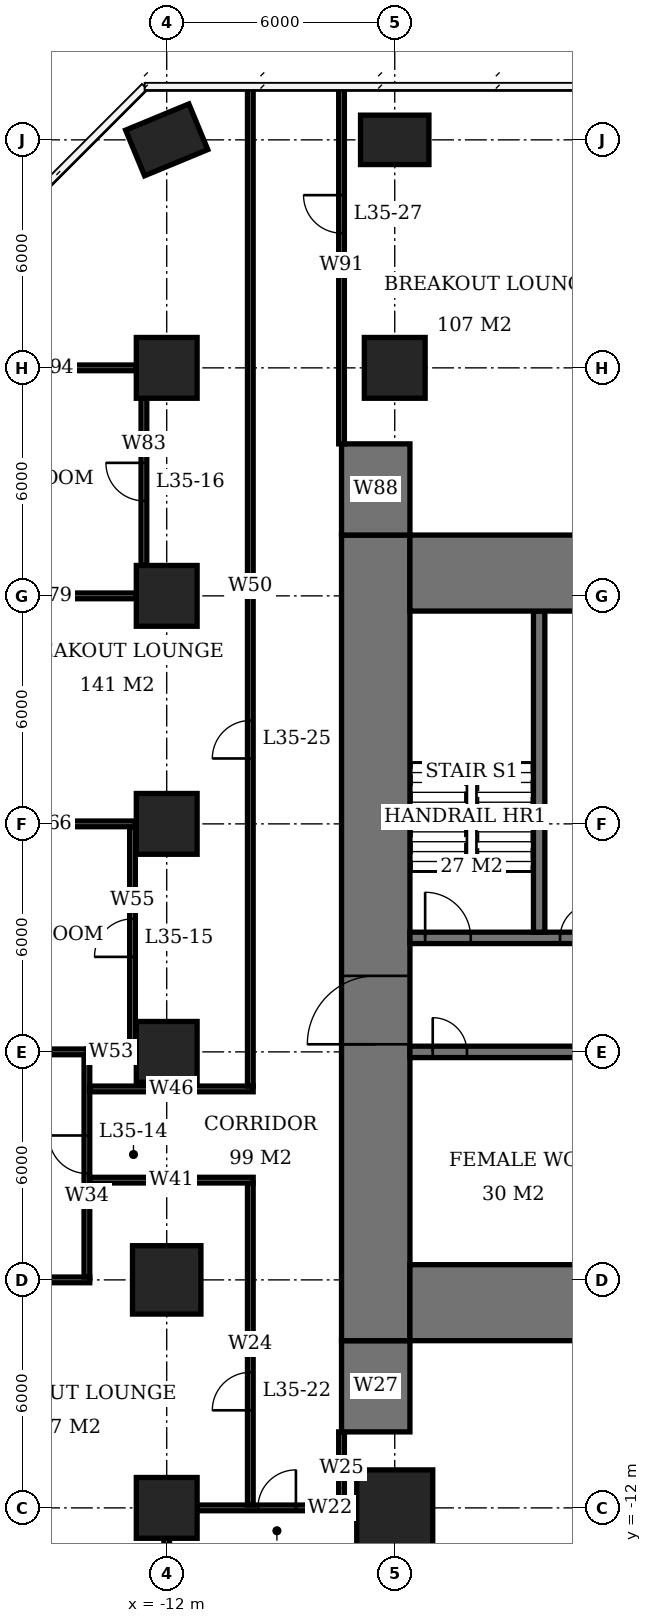
"""IFC4 building model, lengths in metres.
Left out: names, types, materials, properties, quantities, classifications, styles, units other than length and angle.
Written with IfcOpenShell. Run it as: python <this file> out.ifc"""

import sys

from ifc_helpers import new_model, si_unit, direction, frame, frame_2d, origin, origin_2d, place, context, subcontext, project, spatial, rectangle, extrude, element, fill, save


model = new_model("IFC4")
c1 = context("Model", 3, precision=1e-05, world=origin(), true_north=direction((0.0, 1.0)))
c2 = subcontext(c1, "Body", "Model", "MODEL_VIEW")
j1 = project(units=[si_unit("LENGTHUNIT", "METRE"), si_unit("PLANEANGLEUNIT", "RADIAN")], contexts=[c1])
p1 = place(None, origin())
s1 = spatial("IfcSite", under=j1, at=p1, CompositionType="ELEMENT")
p2 = place(p1, origin())
s2 = spatial("IfcBuilding", under=s1, at=p2, CompositionType="ELEMENT")
p3 = place(p2, frame((0.0, 0.0, 144.5)))
s3 = spatial("IfcBuildingStorey", under=s2, at=p3, CompositionType="ELEMENT", Elevation=144.5)
p4 = place(p3, frame((-12.0, -12.0, 0.0), z_axis=(0.0, 0.0, 1.0), x_axis=(1.0, 0.0, 0.0)))
e1 = element("IfcColumn", 1, at=p4, inside=s3, PredefinedType="COLUMN", context=c2, shape_type="SweptSolid", body=[
    extrude(rectangle(XDim=1.6, YDim=1.6, at=origin_2d()), origin(), (0.0, 0.0, 1.0), 3.9),
])
p5 = place(p3, frame((-12.0, -6.0, 0.0), z_axis=(0.0, 0.0, 1.0), x_axis=(1.0, 0.0, 0.0)))
e2 = element("IfcColumn", 2, at=p5, inside=s3, PredefinedType="COLUMN", context=c2, shape_type="SweptSolid", body=[
    extrude(rectangle(XDim=1.8, YDim=1.8, at=origin_2d()), origin(), (0.0, 0.0, 1.0), 3.9),
])
for number, where, z_axis, x_axis in (
    (3, (-12.0, 0.0, 0.0), (0.0, 0.0, 1.0), (1.0, 0.0, 0.0)),
    (4, (-12.0, 6.0, 0.0), (0.0, 0.0, 1.0), (1.0, 0.0, 0.0)),
    (5, (-12.0, 12.0, 0.0), (0.0, 0.0, 1.0), (1.0, 0.0, 0.0)),
    (6, (-12.0, 18.0, 0.0), (0.0, 0.0, 1.0), (1.0, 0.0, 0.0)),
):
    element("IfcColumn", number, at=place(p3, frame(where, z_axis=z_axis, x_axis=x_axis)), inside=s3, PredefinedType="COLUMN", context=c2, shape_type="SweptSolid", body=[
        extrude(rectangle(XDim=1.6, YDim=1.6, at=origin_2d()), origin(), (0.0, 0.0, 1.0), 3.9),
    ])
p6 = place(p3, frame((-12.0, 24.0, 0.0), z_axis=(0.0, 0.0, 1.0), x_axis=(0.923879532511, 0.382683432365, 0.0)))
e7 = element("IfcColumn", 7, at=p6, inside=s3, PredefinedType="COLUMN", context=c2, shape_type="SweptSolid", body=[
    extrude(rectangle(XDim=1.8, YDim=1.3, at=origin_2d()), origin(), (0.0, 0.0, 1.0), 3.9),
])
p7 = place(p3, frame((-6.0, -12.0, 0.0), z_axis=(0.0, 0.0, 1.0), x_axis=(1.0, 0.0, 0.0)))
e8 = element("IfcColumn", 8, at=p7, inside=s3, PredefinedType="COLUMN", context=c2, shape_type="SweptSolid", body=[
    extrude(rectangle(XDim=2.0, YDim=2.0, at=origin_2d()), origin(), (0.0, 0.0, 1.0), 3.9),
])
p8 = place(p3, frame((-6.0, 18.0, 0.0), z_axis=(0.0, 0.0, 1.0), x_axis=(1.0, 0.0, 0.0)))
e9 = element("IfcColumn", 9, at=p8, inside=s3, PredefinedType="COLUMN", context=c2, shape_type="SweptSolid", body=[
    extrude(rectangle(XDim=1.6, YDim=1.6, at=origin_2d()), origin(), (0.0, 0.0, 1.0), 3.9),
])
p9 = place(p3, frame((-6.0, 24.0, 0.0), z_axis=(0.0, 0.0, 1.0), x_axis=(1.0, 0.0, 0.0)))
e10 = element("IfcColumn", 10, at=p9, inside=s3, PredefinedType="COLUMN", context=c2, shape_type="SweptSolid", body=[
    extrude(rectangle(XDim=1.8, YDim=1.3, at=origin_2d()), origin(), (0.0, 0.0, 1.0), 3.9),
])
for number, where, z_axis, x_axis in (
    (11, (-5.6, -6.6, 0.0), (0.0, 0.0, 1.0), (1.0, 0.0, 0.0)),
    (12, (-5.6, 12.6, 0.0), (0.0, 0.0, 1.0), (1.0, 0.0, 0.0)),
):
    element("IfcWall", number, at=place(p3, frame(where, z_axis=z_axis, x_axis=x_axis)), inside=s3, PredefinedType="SHEAR", context=c2, shape_type="SweptSolid", body=[
        extrude(rectangle(XDim=23.2, YDim=2.0, at=frame_2d((11.6, 0.0))), origin(), (0.0, 0.0, 1.0), 3.9),
    ])
p10 = place(p3, frame((-6.5, -7.6, 0.0), z_axis=(0.0, 0.0, 1.0), x_axis=(0.0, 1.0, 0.0)))
e13 = element("IfcWall", 13, at=p10, inside=s3, PredefinedType="SHEAR", context=c2, shape_type="SweptSolid", body=[
    extrude(rectangle(XDim=21.2, YDim=1.8, at=frame_2d((10.6, 0.0))), origin(), (0.0, 0.0, 1.0), 3.9),
])
p11 = place(p10, frame((7.8, 0.0, 0.0)))
e14 = element("IfcOpeningElement", 14, at=p11, cuts=e13, PredefinedType="OPENING", context=c2, shape_type="SweptSolid", body=[
    extrude(rectangle(XDim=1.8, YDim=2.4, at=frame_2d((0.9, 1.2))), frame((0.0, 0.91, 0.0), z_axis=(0.0, -1.0, 0.0), x_axis=(1.0, 0.0, 0.0)), (0.0, 0.0, 1.0), 1.82),
])
for number, where, z_axis, x_axis in (
    (15, (-6.5, -10.0, 0.0), (0.0, 0.0, 1.0), (0.0, 1.0, 0.0)),
    (16, (-6.5, 13.6, 0.0), (0.0, 0.0, 1.0), (0.0, 1.0, 0.0)),
):
    element("IfcWall", number, at=place(p3, frame(where, z_axis=z_axis, x_axis=x_axis)), inside=s3, PredefinedType="SHEAR", context=c2, shape_type="SweptSolid", body=[
        extrude(rectangle(XDim=2.4, YDim=1.8, at=frame_2d((1.2, 0.0))), origin(), (0.0, 0.0, 1.0), 3.9),
    ])
p12 = place(p3, frame((-5.6, 0.0, 0.0), z_axis=(0.0, 0.0, 1.0), x_axis=(1.0, 0.0, 0.0)))
e17 = element("IfcWall", 17, at=p12, inside=s3, PredefinedType="SHEAR", context=c2, shape_type="SweptSolid", body=[
    extrude(rectangle(XDim=17.75, YDim=0.3, at=frame_2d((8.875, 0.0))), origin(), (0.0, 0.0, 1.0), 3.9),
])
p13 = place(p12, frame((0.6, 0.0, 0.0)))
e18 = element("IfcOpeningElement", 18, at=p13, cuts=e17, PredefinedType="OPENING", context=c2, shape_type="SweptSolid", body=[
    extrude(rectangle(XDim=0.9, YDim=2.1, at=frame_2d((0.45, 1.05))), frame((0.0, 0.16, 0.0), z_axis=(0.0, -1.0, 0.0), x_axis=(1.0, 0.0, 0.0)), (0.0, 0.0, 1.0), 0.32),
])
p14 = place(p12, frame((6.55, 0.0, 0.0)))
e19 = element("IfcOpeningElement", 19, at=p14, cuts=e17, PredefinedType="OPENING", context=c2, shape_type="SweptSolid", body=[
    extrude(rectangle(XDim=1.1, YDim=2.1, at=frame_2d((0.55, 1.05))), frame((0.0, 0.16, 0.0), z_axis=(0.0, -1.0, 0.0), x_axis=(1.0, 0.0, 0.0)), (0.0, 0.0, 1.0), 0.32),
])
p15 = place(p12, frame((9.55, 0.0, 0.0)))
e20 = element("IfcOpeningElement", 20, at=p15, cuts=e17, PredefinedType="OPENING", context=c2, shape_type="SweptSolid", body=[
    extrude(rectangle(XDim=1.1, YDim=2.1, at=frame_2d((0.55, 1.05))), frame((0.0, 0.16, 0.0), z_axis=(0.0, -1.0, 0.0), x_axis=(1.0, 0.0, 0.0)), (0.0, 0.0, 1.0), 0.32),
])
p16 = place(p3, frame((-5.6, 3.0, 0.0), z_axis=(0.0, 0.0, 1.0), x_axis=(1.0, 0.0, 0.0)))
e21 = element("IfcWall", 21, at=p16, inside=s3, PredefinedType="SHEAR", context=c2, shape_type="SweptSolid", body=[
    extrude(rectangle(XDim=5.45, YDim=0.3, at=frame_2d((2.725, 0.0))), origin(), (0.0, 0.0, 1.0), 3.9),
])
p17 = place(p16, frame((0.4, 0.0, 0.0)))
e22 = element("IfcOpeningElement", 22, at=p17, cuts=e21, PredefinedType="OPENING", context=c2, shape_type="SweptSolid", body=[
    extrude(rectangle(XDim=1.2, YDim=2.1, at=frame_2d((0.6, 1.05))), frame((0.0, 0.16, 0.0), z_axis=(0.0, -1.0, 0.0), x_axis=(1.0, 0.0, 0.0)), (0.0, 0.0, 1.0), 0.32),
])
p18 = place(p16, frame((3.95, 0.0, 0.0)))
e23 = element("IfcOpeningElement", 23, at=p18, cuts=e21, PredefinedType="OPENING", context=c2, shape_type="SweptSolid", body=[
    extrude(rectangle(XDim=0.9, YDim=2.1, at=frame_2d((0.45, 1.05))), frame((0.0, 0.16, 0.0), z_axis=(0.0, -1.0, 0.0), x_axis=(1.0, 0.0, 0.0)), (0.0, 0.0, 1.0), 0.32),
])
p19 = place(p3, frame((-2.2, 3.15, 0.0), z_axis=(0.0, 0.0, 1.0), x_axis=(0.0, 1.0, 0.0)))
e24 = element("IfcWall", 24, at=p19, inside=s3, PredefinedType="SHEAR", context=c2, shape_type="SweptSolid", body=[
    extrude(rectangle(XDim=8.45, YDim=0.3, at=frame_2d((4.225, 0.0))), origin(), (0.0, 0.0, 1.0), 3.9),
])
p20 = place(p3, frame((-11.2, -12.0, 0.0), z_axis=(0.0, 0.0, 1.0), x_axis=(1.0, 0.0, 0.0)))
e25 = element("IfcWall", 25, at=p20, inside=s3, PredefinedType="PARTITIONING", context=c2, shape_type="SweptSolid", body=[
    extrude(rectangle(XDim=4.2, YDim=0.15, at=frame_2d((2.1, 0.0))), origin(), (0.0, 0.0, 1.0), 3.65),
])
p21 = place(p20, frame((1.6, 0.0, 0.0)))
e26 = element("IfcOpeningElement", 26, at=p21, cuts=e25, PredefinedType="OPENING", context=c2, shape_type="SweptSolid", body=[
    extrude(rectangle(XDim=1.0, YDim=2.1, at=frame_2d((0.5, 1.05))), frame((0.0, 0.085, 0.0), z_axis=(0.0, -1.0, 0.0), x_axis=(1.0, 0.0, 0.0)), (0.0, 0.0, 1.0), 0.17),
])
for number, where, z_axis, x_axis in (
    (27, (-17.35, -6.0, 0.0), (0.0, 0.0, 1.0), (1.0, 0.0, 0.0)),
    (28, (-17.35, 0.0, 0.0), (0.0, 0.0, 1.0), (1.0, 0.0, 0.0)),
):
    element("IfcWall", number, at=place(p3, frame(where, z_axis=z_axis, x_axis=x_axis)), inside=s3, PredefinedType="PARTITIONING", context=c2, shape_type="SweptSolid", body=[
        extrude(rectangle(XDim=3.325, YDim=0.15, at=frame_2d((1.663, 0.0))), origin(), (0.0, 0.0, 1.0), 3.65),
    ])
p22 = place(p3, frame((-14.1, 0.0, 0.0), z_axis=(0.0, 0.0, 1.0), x_axis=(1.0, 0.0, 0.0)))
e29 = element("IfcWall", 29, at=p22, inside=s3, PredefinedType="PARTITIONING", context=c2, shape_type="SweptSolid", body=[
    extrude(rectangle(XDim=1.275, YDim=0.15, at=frame_2d((0.638, 0.0))), origin(), (0.0, 0.0, 1.0), 3.65),
])
p23 = place(p3, frame((-17.35, 6.0, 0.0), z_axis=(0.0, 0.0, 1.0), x_axis=(1.0, 0.0, 0.0)))
e30 = element("IfcWall", 30, at=p23, inside=s3, PredefinedType="PARTITIONING", context=c2, shape_type="SweptSolid", body=[
    extrude(rectangle(XDim=4.525, YDim=0.15, at=frame_2d((2.263, 0.0))), origin(), (0.0, 0.0, 1.0), 3.65),
])
p24 = place(p3, frame((-17.35, 12.0, 0.0), z_axis=(0.0, 0.0, 1.0), x_axis=(1.0, 0.0, 0.0)))
e31 = element("IfcWall", 31, at=p24, inside=s3, PredefinedType="PARTITIONING", context=c2, shape_type="SweptSolid", body=[
    extrude(rectangle(XDim=4.55, YDim=0.15, at=frame_2d((2.275, 0.0))), origin(), (0.0, 0.0, 1.0), 3.65),
])
p25 = place(p3, frame((-17.265, 18.0, 0.0), z_axis=(0.0, 0.0, 1.0), x_axis=(1.0, 0.0, 0.0)))
e32 = element("IfcWall", 32, at=p25, inside=s3, PredefinedType="PARTITIONING", context=c2, shape_type="SweptSolid", body=[
    extrude(rectangle(XDim=4.465, YDim=0.15, at=frame_2d((2.233, 0.0))), origin(), (0.0, 0.0, 1.0), 3.65),
])
p26 = place(p3, frame((-14.1, -5.925, 0.0), z_axis=(0.0, 0.0, 1.0), x_axis=(0.0, 1.0, 0.0)))
e33 = element("IfcWall", 33, at=p26, inside=s3, PredefinedType="PARTITIONING", context=c2, shape_type="SweptSolid", body=[
    extrude(rectangle(XDim=5.85, YDim=0.15, at=frame_2d((2.925, 0.0))), origin(), (0.0, 0.0, 1.0), 3.65),
])
p27 = place(p26, frame((2.725, 0.0, 0.0)))
e34 = element("IfcOpeningElement", 34, at=p27, cuts=e33, PredefinedType="OPENING", context=c2, shape_type="SweptSolid", body=[
    extrude(rectangle(XDim=1.0, YDim=2.1, at=frame_2d((0.5, 1.05))), frame((0.0, 0.085, 0.0), z_axis=(0.0, -1.0, 0.0), x_axis=(1.0, 0.0, 0.0)), (0.0, 0.0, 1.0), 0.17),
])
p28 = place(p3, frame((-12.9, 0.075, 0.0), z_axis=(0.0, 0.0, 1.0), x_axis=(0.0, 1.0, 0.0)))
e35 = element("IfcWall", 35, at=p28, inside=s3, PredefinedType="PARTITIONING", context=c2, shape_type="SweptSolid", body=[
    extrude(rectangle(XDim=5.85, YDim=0.15, at=frame_2d((2.925, 0.0))), origin(), (0.0, 0.0, 1.0), 3.65),
])
p29 = place(p28, frame((2.425, 0.0, 0.0)))
e36 = element("IfcOpeningElement", 36, at=p29, cuts=e35, PredefinedType="OPENING", context=c2, shape_type="SweptSolid", body=[
    extrude(rectangle(XDim=1.0, YDim=2.1, at=frame_2d((0.5, 1.05))), frame((0.0, 0.085, 0.0), z_axis=(0.0, -1.0, 0.0), x_axis=(1.0, 0.0, 0.0)), (0.0, 0.0, 1.0), 0.17),
])
p30 = place(p3, frame((-12.6, 12.8, 0.0), z_axis=(0.0, 0.0, 1.0), x_axis=(0.0, 1.0, 0.0)))
e37 = element("IfcWall", 37, at=p30, inside=s3, PredefinedType="PARTITIONING", context=c2, shape_type="SweptSolid", body=[
    extrude(rectangle(XDim=4.4, YDim=0.15, at=frame_2d((2.2, 0.0))), origin(), (0.0, 0.0, 1.0), 3.65),
])
p31 = place(p30, frame((1.7, 0.0, 0.0)))
e38 = element("IfcOpeningElement", 38, at=p31, cuts=e37, PredefinedType="OPENING", context=c2, shape_type="SweptSolid", body=[
    extrude(rectangle(XDim=1.0, YDim=2.1, at=frame_2d((0.5, 1.05))), frame((0.0, 0.085, 0.0), z_axis=(0.0, -1.0, 0.0), x_axis=(1.0, 0.0, 0.0)), (0.0, 0.0, 1.0), 0.17),
])
p32 = place(p3, frame((-12.0, -16.31, 0.0), z_axis=(0.0, 0.0, 1.0), x_axis=(0.0, 1.0, 0.0)))
e39 = element("IfcWall", 39, at=p32, inside=s3, PredefinedType="PARTITIONING", context=c2, shape_type="SweptSolid", body=[
    extrude(rectangle(XDim=3.51, YDim=0.15, at=frame_2d((1.755, 0.0))), origin(), (0.0, 0.0, 1.0), 2.65),
])
for number, where, z_axis, x_axis in (
    (40, (-14.025, -3.375, 0.0), (0.0, 0.0, 1.0), (1.0, 0.0, 0.0)),
    (41, (-14.025, -0.975, 0.0), (0.0, 0.0, 1.0), (1.0, 0.0, 0.0)),
):
    element("IfcWall", number, at=place(p3, frame(where, z_axis=z_axis, x_axis=x_axis)), inside=s3, PredefinedType="PARTITIONING", context=c2, shape_type="SweptSolid", body=[
        extrude(rectangle(XDim=4.3, YDim=0.15, at=frame_2d((2.15, 0.0))), origin(), (0.0, 0.0, 1.0), 3.65),
    ])
p33 = place(p3, frame((-9.8, -11.925, 0.0), z_axis=(0.0, 0.0, 1.0), x_axis=(0.0, 1.0, 0.0)))
e42 = element("IfcWall", 42, at=p33, inside=s3, PredefinedType="PARTITIONING", context=c2, shape_type="SweptSolid", body=[
    extrude(rectangle(XDim=8.475, YDim=0.15, at=frame_2d((4.238, 0.0))), origin(), (0.0, 0.0, 1.0), 3.65),
])
p34 = place(p33, frame((2.493, 0.0, 0.0)))
e43 = element("IfcOpeningElement", 43, at=p34, cuts=e42, PredefinedType="OPENING", context=c2, shape_type="SweptSolid", body=[
    extrude(rectangle(XDim=1.0, YDim=2.1, at=frame_2d((0.5, 1.05))), frame((0.0, 0.085, 0.0), z_axis=(0.0, -1.0, 0.0), x_axis=(1.0, 0.0, 0.0)), (0.0, 0.0, 1.0), 0.17),
])
p35 = place(p3, frame((-9.8, -0.9, 0.0), z_axis=(0.0, 0.0, 1.0), x_axis=(0.0, 1.0, 0.0)))
e44 = element("IfcWall", 44, at=p35, inside=s3, PredefinedType="PARTITIONING", context=c2, shape_type="SweptSolid", body=[
    extrude(rectangle(XDim=26.3, YDim=0.15, at=frame_2d((13.15, 0.0))), origin(), (0.0, 0.0, 1.0), 3.65),
])
p36 = place(p35, frame((8.621, 0.0, 0.0)))
e45 = element("IfcOpeningElement", 45, at=p36, cuts=e44, PredefinedType="OPENING", context=c2, shape_type="SweptSolid", body=[
    extrude(rectangle(XDim=1.0, YDim=2.1, at=frame_2d((0.5, 1.05))), frame((0.0, 0.085, 0.0), z_axis=(0.0, -1.0, 0.0), x_axis=(1.0, 0.0, 0.0)), (0.0, 0.0, 1.0), 0.17),
])
p37 = place(p3, frame((-7.4, -11.925, 0.0), z_axis=(0.0, 0.0, 1.0), x_axis=(0.0, 1.0, 0.0)))
e46 = element("IfcWall", 46, at=p37, inside=s3, PredefinedType="PARTITIONING", context=c2, shape_type="SweptSolid", body=[
    extrude(rectangle(XDim=1.925, YDim=0.15, at=frame_2d((0.962, 0.0))), origin(), (0.0, 0.0, 1.0), 3.65),
])
p38 = place(p3, frame((-7.4, 16.0, 0.0), z_axis=(0.0, 0.0, 1.0), x_axis=(0.0, 1.0, 0.0)))
e47 = element("IfcWall", 47, at=p38, inside=s3, PredefinedType="PARTITIONING", context=c2, shape_type="SweptSolid", body=[
    extrude(rectangle(XDim=9.4, YDim=0.15, at=frame_2d((4.7, 0.0))), origin(), (0.0, 0.0, 1.0), 3.65),
])
p39 = place(p38, frame((5.545, 0.0, 0.0)))
e48 = element("IfcOpeningElement", 48, at=p39, cuts=e47, PredefinedType="OPENING", context=c2, shape_type="SweptSolid", body=[
    extrude(rectangle(XDim=1.0, YDim=2.1, at=frame_2d((0.5, 1.05))), frame((0.0, 0.085, 0.0), z_axis=(0.0, -1.0, 0.0), x_axis=(1.0, 0.0, 0.0)), (0.0, 0.0, 1.0), 0.17),
])
p40 = place(p11, origin())
e49 = element("IfcDoor", 49, at=p40, inside=s3, OperationType="DOUBLE_DOOR_SINGLE_SWING", PredefinedType="DOOR", context=c2, shape_type="SweptSolid", body=[
    extrude(rectangle(XDim=1.8, YDim=2.4, at=frame_2d((0.9, 1.2))), frame((0.0, 0.025, 0.0), z_axis=(0.0, -1.0, 0.0), x_axis=(1.0, 0.0, 0.0)), (0.0, 0.0, 1.0), 0.05),
])
fill(e14, e49)
p41 = place(p17, origin())
e50 = element("IfcDoor", 50, at=p41, inside=s3, OperationType="SINGLE_SWING_LEFT", PredefinedType="DOOR", context=c2, shape_type="SweptSolid", body=[
    extrude(rectangle(XDim=1.2, YDim=2.1, at=frame_2d((0.6, 1.05))), frame((0.0, 0.025, 0.0), z_axis=(0.0, -1.0, 0.0), x_axis=(1.0, 0.0, 0.0)), (0.0, 0.0, 1.0), 0.05),
])
fill(e22, e50)
p42 = place(p18, origin())
e51 = element("IfcDoor", 51, at=p42, inside=s3, OperationType="SINGLE_SWING_RIGHT", PredefinedType="DOOR", context=c2, shape_type="SweptSolid", body=[
    extrude(rectangle(XDim=0.9, YDim=2.1, at=frame_2d((0.45, 1.05))), frame((0.0, 0.025, 0.0), z_axis=(0.0, -1.0, 0.0), x_axis=(1.0, 0.0, 0.0)), (0.0, 0.0, 1.0), 0.05),
])
fill(e23, e51)
p43 = place(p13, origin())
e52 = element("IfcDoor", 52, at=p43, inside=s3, OperationType="SINGLE_SWING_LEFT", PredefinedType="DOOR", context=c2, shape_type="SweptSolid", body=[
    extrude(rectangle(XDim=0.9, YDim=2.1, at=frame_2d((0.45, 1.05))), frame((0.0, 0.025, 0.0), z_axis=(0.0, -1.0, 0.0), x_axis=(1.0, 0.0, 0.0)), (0.0, 0.0, 1.0), 0.05),
])
fill(e18, e52)
p44 = place(p21, origin())
e53 = element("IfcDoor", 53, at=p44, inside=s3, OperationType="SINGLE_SWING_RIGHT", PredefinedType="DOOR", context=c2, shape_type="SweptSolid", body=[
    extrude(rectangle(XDim=1.0, YDim=2.1, at=frame_2d((0.5, 1.05))), frame((0.0, 0.025, 0.0), z_axis=(0.0, -1.0, 0.0), x_axis=(1.0, 0.0, 0.0)), (0.0, 0.0, 1.0), 0.05),
])
fill(e26, e53)
p45 = place(p27, origin())
e54 = element("IfcDoor", 54, at=p45, inside=s3, OperationType="SINGLE_SWING_RIGHT", PredefinedType="DOOR", context=c2, shape_type="SweptSolid", body=[
    extrude(rectangle(XDim=1.0, YDim=2.1, at=frame_2d((0.5, 1.05))), frame((0.0, 0.025, 0.0), z_axis=(0.0, -1.0, 0.0), x_axis=(1.0, 0.0, 0.0)), (0.0, 0.0, 1.0), 0.05),
])
fill(e34, e54)
p46 = place(p29, origin())
e55 = element("IfcDoor", 55, at=p46, inside=s3, OperationType="SINGLE_SWING_LEFT", PredefinedType="DOOR", context=c2, shape_type="SweptSolid", body=[
    extrude(rectangle(XDim=1.0, YDim=2.1, at=frame_2d((0.5, 1.05))), frame((0.0, 0.025, 0.0), z_axis=(0.0, -1.0, 0.0), x_axis=(1.0, 0.0, 0.0)), (0.0, 0.0, 1.0), 0.05),
])
fill(e36, e55)
p47 = place(p31, origin())
e56 = element("IfcDoor", 56, at=p47, inside=s3, OperationType="SINGLE_SWING_RIGHT", PredefinedType="DOOR", context=c2, shape_type="SweptSolid", body=[
    extrude(rectangle(XDim=1.0, YDim=2.1, at=frame_2d((0.5, 1.05))), frame((0.0, 0.025, 0.0), z_axis=(0.0, -1.0, 0.0), x_axis=(1.0, 0.0, 0.0)), (0.0, 0.0, 1.0), 0.05),
])
fill(e38, e56)
p48 = place(p34, origin())
e57 = element("IfcDoor", 57, at=p48, inside=s3, OperationType="SINGLE_SWING_LEFT", PredefinedType="DOOR", context=c2, shape_type="SweptSolid", body=[
    extrude(rectangle(XDim=1.0, YDim=2.1, at=frame_2d((0.5, 1.05))), frame((0.0, 0.025, 0.0), z_axis=(0.0, -1.0, 0.0), x_axis=(1.0, 0.0, 0.0)), (0.0, 0.0, 1.0), 0.05),
])
fill(e43, e57)
p49 = place(p36, origin())
e58 = element("IfcDoor", 58, at=p49, inside=s3, OperationType="SINGLE_SWING_LEFT", PredefinedType="DOOR", context=c2, shape_type="SweptSolid", body=[
    extrude(rectangle(XDim=1.0, YDim=2.1, at=frame_2d((0.5, 1.05))), frame((0.0, 0.025, 0.0), z_axis=(0.0, -1.0, 0.0), x_axis=(1.0, 0.0, 0.0)), (0.0, 0.0, 1.0), 0.05),
])
fill(e45, e58)
p50 = place(p39, origin())
e59 = element("IfcDoor", 59, at=p50, inside=s3, OperationType="SINGLE_SWING_RIGHT", PredefinedType="DOOR", context=c2, shape_type="SweptSolid", body=[
    extrude(rectangle(XDim=1.0, YDim=2.1, at=frame_2d((0.5, 1.05))), frame((0.0, 0.025, 0.0), z_axis=(0.0, -1.0, 0.0), x_axis=(1.0, 0.0, 0.0)), (0.0, 0.0, 1.0), 0.05),
])
fill(e48, e59)
save(model, sys.argv[1])
